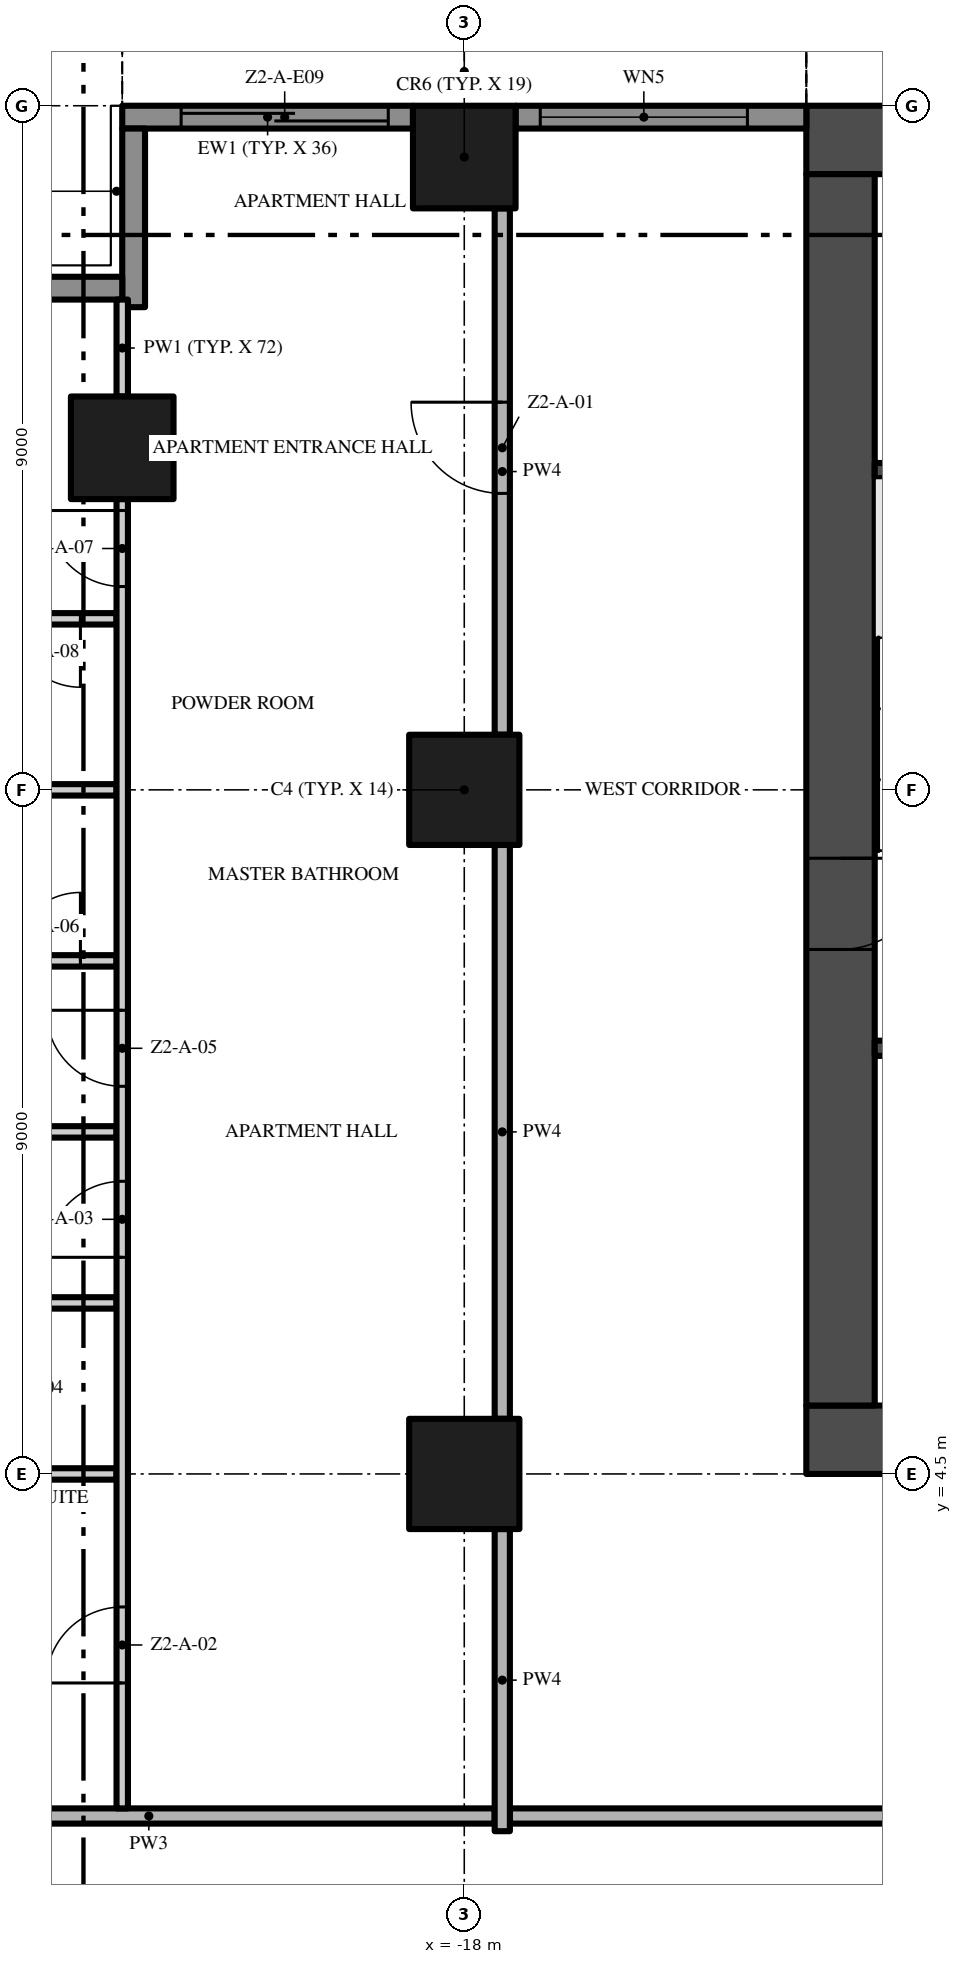
"""IFC4 building model, lengths in metres.
Left out: names, types, materials, properties, quantities, classifications, styles, units other than length and angle.
Written with IfcOpenShell. Run it as: python <this file> out.ifc"""

import sys

from ifc_helpers import new_model, si_unit, direction, frame, frame_2d, origin, origin_2d, place, context, subcontext, project, spatial, rectangle, extrude, element, fill, save


model = new_model("IFC4")
c1 = context("Model", 3, precision=1e-05, world=origin(), true_north=direction((0.0, 1.0)))
c2 = subcontext(c1, "Body", "Model", "MODEL_VIEW")
j1 = project(units=[si_unit("LENGTHUNIT", "METRE"), si_unit("PLANEANGLEUNIT", "RADIAN")], contexts=[c1])
p1 = place(None, origin())
s1 = spatial("IfcSite", under=j1, at=p1, CompositionType="ELEMENT")
p2 = place(p1, origin())
s2 = spatial("IfcBuilding", under=s1, at=p2, CompositionType="ELEMENT")
p3 = place(p2, frame((0.0, 0.0, 73.2)))
s3 = spatial("IfcBuildingStorey", under=s2, at=p3, CompositionType="ELEMENT", Elevation=73.2)
p4 = place(p3, frame((-13.5, 4.95, -0.3), z_axis=(0.0, 0.0, 1.0), x_axis=(1.0, 0.0, 0.0)))
e1 = element("IfcWall", 1, at=p4, inside=s3, PredefinedType="SHEAR", context=c2, shape_type="SweptSolid", body=[
    extrude(rectangle(XDim=27.0, YDim=0.9, at=frame_2d((13.5, 0.0))), origin(), (0.0, 0.0, 1.0), 3.8),
])
p5 = place(p4, frame((12.0, 0.0, 0.3)))
e2 = element("IfcOpeningElement", 2, at=p5, cuts=e1, PredefinedType="OPENING", context=c2, shape_type="SweptSolid", body=[
    extrude(rectangle(XDim=3.0, YDim=2.4, at=frame_2d((1.5, 1.2))), frame((0.0, 0.46, 0.0), z_axis=(0.0, -1.0, 0.0), x_axis=(1.0, 0.0, 0.0)), (0.0, 0.0, 1.0), 0.92),
])
p6 = place(p4, frame((4.9, 0.0, 0.3)))
e3 = element("IfcOpeningElement", 3, at=p6, cuts=e1, PredefinedType="OPENING", context=c2, shape_type="SweptSolid", body=[
    extrude(rectangle(XDim=1.2, YDim=2.2, at=frame_2d((0.6, 1.1))), frame((0.0, 0.46, 0.0), z_axis=(0.0, -1.0, 0.0), x_axis=(1.0, 0.0, 0.0)), (0.0, 0.0, 1.0), 0.92),
])
p7 = place(p4, frame((20.75, 0.0, 0.3)))
e4 = element("IfcOpeningElement", 4, at=p7, cuts=e1, PredefinedType="OPENING", context=c2, shape_type="SweptSolid", body=[
    extrude(rectangle(XDim=1.5, YDim=2.2, at=frame_2d((0.75, 1.1))), frame((0.0, 0.46, 0.0), z_axis=(0.0, -1.0, 0.0), x_axis=(1.0, 0.0, 0.0)), (0.0, 0.0, 1.0), 0.92),
])
p8 = place(p4, frame((17.4, 0.0, 0.3)))
e5 = element("IfcOpeningElement", 5, at=p8, cuts=e1, PredefinedType="OPENING", context=c2, shape_type="SweptSolid", body=[
    extrude(rectangle(XDim=1.2, YDim=2.2, at=frame_2d((0.6, 1.1))), frame((0.0, 0.46, 0.0), z_axis=(0.0, -1.0, 0.0), x_axis=(1.0, 0.0, 0.0)), (0.0, 0.0, 1.0), 0.92),
])
p9 = place(p3, frame((13.5, 22.05, -0.3), z_axis=(0.0, 0.0, 1.0), x_axis=(-1.0, 0.0, 0.0)))
e6 = element("IfcWall", 6, at=p9, inside=s3, PredefinedType="SHEAR", context=c2, shape_type="SweptSolid", body=[
    extrude(rectangle(XDim=27.0, YDim=0.9, at=frame_2d((13.5, 0.0))), origin(), (0.0, 0.0, 1.0), 3.8),
])
p10 = place(p3, frame((-13.05, 21.6, -0.3), z_axis=(0.0, 0.0, 1.0), x_axis=(0.0, -1.0, 0.0)))
e7 = element("IfcWall", 7, at=p10, inside=s3, PredefinedType="SHEAR", context=c2, shape_type="SweptSolid", body=[
    extrude(rectangle(XDim=16.2, YDim=0.9, at=frame_2d((8.1, 0.0))), origin(), (0.0, 0.0, 1.0), 3.8),
])
p11 = place(p10, frame((9.0, 0.0, 0.3)))
e8 = element("IfcOpeningElement", 8, at=p11, cuts=e7, PredefinedType="OPENING", context=c2, shape_type="SweptSolid", body=[
    extrude(rectangle(XDim=1.2, YDim=2.2, at=frame_2d((0.6, 1.1))), frame((0.0, 0.46, 0.0), z_axis=(0.0, -1.0, 0.0), x_axis=(1.0, 0.0, 0.0)), (0.0, 0.0, 1.0), 0.92),
])
p12 = place(p3, frame((-18.0, 13.5, 0.0), z_axis=(0.0, 0.0, 1.0), x_axis=(1.0, 0.0, 0.0)))
e9 = element("IfcColumn", 9, at=p12, inside=s3, PredefinedType="COLUMN", context=c2, shape_type="SweptSolid", body=[
    extrude(rectangle(XDim=1.45, YDim=1.45, at=origin_2d()), origin(), (0.0, 0.0, 1.0), 3.5),
])
p13 = place(p3, frame((-18.0, 21.825, 0.0), z_axis=(0.0, 0.0, 1.0), x_axis=(1.0, 0.0, 0.0)))
e10 = element("IfcColumn", 10, at=p13, inside=s3, PredefinedType="COLUMN", context=c2, shape_type="SweptSolid", body=[
    extrude(rectangle(XDim=1.35, YDim=1.35, at=origin_2d()), origin(), (0.0, 0.0, 1.0), 3.5),
])
p14 = place(p3, frame((-18.0, 4.5, 0.0), z_axis=(0.0, 0.0, 1.0), x_axis=(1.0, 0.0, 0.0)))
e11 = element("IfcColumn", 11, at=p14, inside=s3, PredefinedType="COLUMN", context=c2, shape_type="SweptSolid", body=[
    extrude(rectangle(XDim=1.45, YDim=1.45, at=origin_2d()), origin(), (0.0, 0.0, 1.0), 3.5),
])
p15 = place(p3, frame((-22.5, 18.0, 0.0), z_axis=(0.0, 0.0, 1.0), x_axis=(1.0, 0.0, 0.0)))
e12 = element("IfcColumn", 12, at=p15, inside=s3, PredefinedType="COLUMN", context=c2, shape_type="SweptSolid", body=[
    extrude(rectangle(XDim=1.35, YDim=1.35, at=origin_2d()), origin(), (0.0, 0.0, 1.0), 3.5),
])
p16 = place(p3, frame((-17.325, 22.35, 0.0), z_axis=(0.0, 0.0, 1.0), x_axis=(1.0, 0.0, 0.0)))
e13 = element("IfcWall", 13, at=p16, inside=s3, PredefinedType="SOLIDWALL", context=c2, shape_type="SweptSolid", body=[
    extrude(rectangle(XDim=3.825, YDim=0.3, at=frame_2d((1.913, 0.0))), origin(), (0.0, 0.0, 1.0), 3.5),
])
p17 = place(p16, frame((0.325, 0.0, 0.45)))
e14 = element("IfcOpeningElement", 14, at=p17, cuts=e13, PredefinedType="OPENING", context=c2, shape_type="SweptSolid", body=[
    extrude(rectangle(XDim=2.725, YDim=2.65, at=frame_2d((1.363, 1.325))), frame((0.0, 0.16, 0.0), z_axis=(0.0, -1.0, 0.0), x_axis=(1.0, 0.0, 0.0)), (0.0, 0.0, 1.0), 0.32),
])
p18 = place(p3, frame((-22.5, 22.35, 0.0), z_axis=(0.0, 0.0, 1.0), x_axis=(1.0, 0.0, 0.0)))
e15 = element("IfcWall", 15, at=p18, inside=s3, PredefinedType="SOLIDWALL", context=c2, shape_type="SweptSolid", body=[
    extrude(rectangle(XDim=3.825, YDim=0.3, at=frame_2d((1.913, 0.0))), origin(), (0.0, 0.0, 1.0), 3.5),
])
p19 = place(p18, frame((0.775, 0.0, 0.0)))
e16 = element("IfcOpeningElement", 16, at=p19, cuts=e15, PredefinedType="OPENING", context=c2, shape_type="SweptSolid", body=[
    extrude(rectangle(XDim=2.725, YDim=2.4, at=frame_2d((1.363, 1.2))), frame((0.0, 0.16, 0.0), z_axis=(0.0, -1.0, 0.0), x_axis=(1.0, 0.0, 0.0)), (0.0, 0.0, 1.0), 0.32),
])
p20 = place(p3, frame((-22.35, 19.85, 0.0), z_axis=(0.0, 0.0, 1.0), x_axis=(0.0, 1.0, 0.0)))
e17 = element("IfcWall", 17, at=p20, inside=s3, PredefinedType="SOLIDWALL", context=c2, shape_type="SweptSolid", body=[
    extrude(rectangle(XDim=2.35, YDim=0.3, at=frame_2d((1.175, 0.0))), origin(), (0.0, 0.0, 1.0), 3.5),
])
p21 = place(p3, frame((-24.75, 20.1, 0.0), z_axis=(0.0, 0.0, 1.0), x_axis=(1.0, 0.0, 0.0)))
e18 = element("IfcWall", 18, at=p21, inside=s3, PredefinedType="SOLIDWALL", context=c2, shape_type="SweptSolid", body=[
    extrude(rectangle(XDim=2.25, YDim=0.3, at=frame_2d((1.125, 0.0))), origin(), (0.0, 0.0, 1.0), 3.5),
])
for number, where, z_axis, x_axis in (
    (19, (-12.6, 10.1, 0.0), (0.0, 0.0, 1.0), (1.0, 0.0, 0.0)),
    (20, (-12.6, 17.7, 0.0), (0.0, 0.0, 1.0), (1.0, 0.0, 0.0)),
):
    element("IfcWall", number, at=place(p3, frame(where, z_axis=z_axis, x_axis=x_axis)), inside=s3, PredefinedType="SHEAR", context=c2, shape_type="SweptSolid", body=[
        extrude(rectangle(XDim=2.95, YDim=0.2, at=frame_2d((1.475, 0.0))), origin(), (0.0, 0.0, 1.0), 3.5),
    ])
p22 = place(p3, frame((-0.1, 0.0, 0.0), z_axis=(0.0, 0.0, 1.0), x_axis=(-1.0, 0.0, 0.0)))
e21 = element("IfcWall", 21, at=p22, inside=s3, PredefinedType="PARTITIONING", context=c2, shape_type="SweptSolid", body=[
    extrude(rectangle(XDim=17.3, YDim=0.2, at=frame_2d((8.65, 0.0))), origin(), (0.0, 0.0, 1.0), 3.5),
])
p23 = place(p22, frame((8.15, 0.0, 0.0)))
e22 = element("IfcOpeningElement", 22, at=p23, cuts=e21, PredefinedType="OPENING", context=c2, shape_type="SweptSolid", body=[
    extrude(rectangle(XDim=1.5, YDim=2.4, at=frame_2d((0.75, 1.2))), frame((0.0, 0.11, 0.0), z_axis=(0.0, -1.0, 0.0), x_axis=(1.0, 0.0, 0.0)), (0.0, 0.0, 1.0), 0.22),
])
p24 = place(p3, frame((-26.7, 0.0, 0.0), z_axis=(0.0, 0.0, 1.0), x_axis=(1.0, 0.0, 0.0)))
e23 = element("IfcWall", 23, at=p24, inside=s3, PredefinedType="PARTITIONING", context=c2, shape_type="SweptSolid", body=[
    extrude(rectangle(XDim=9.1, YDim=0.2, at=frame_2d((4.55, 0.0))), origin(), (0.0, 0.0, 1.0), 3.5),
])
p25 = place(p3, frame((-25.65, 4.5, 0.0), z_axis=(0.0, 0.0, 1.0), x_axis=(1.0, 0.0, 0.0)))
e24 = element("IfcWall", 24, at=p25, inside=s3, PredefinedType="PARTITIONING", context=c2, shape_type="SweptSolid", body=[
    extrude(rectangle(XDim=3.075, YDim=0.15, at=frame_2d((1.538, 0.0))), origin(), (0.0, 0.0, 1.0), 3.5),
])
p26 = place(p3, frame((-24.45, 6.75, 0.0), z_axis=(0.0, 0.0, 1.0), x_axis=(1.0, 0.0, 0.0)))
e25 = element("IfcWall", 25, at=p26, inside=s3, PredefinedType="PARTITIONING", context=c2, shape_type="SweptSolid", body=[
    extrude(rectangle(XDim=1.875, YDim=0.15, at=frame_2d((0.938, 0.0))), origin(), (0.0, 0.0, 1.0), 3.5),
])
p27 = place(p3, frame((-26.7, 9.0, 0.0), z_axis=(0.0, 0.0, 1.0), x_axis=(1.0, 0.0, 0.0)))
e26 = element("IfcWall", 26, at=p27, inside=s3, PredefinedType="PARTITIONING", context=c2, shape_type="SweptSolid", body=[
    extrude(rectangle(XDim=4.125, YDim=0.15, at=frame_2d((2.062, 0.0))), origin(), (0.0, 0.0, 1.0), 3.5),
])
p28 = place(p3, frame((-24.45, 11.25, 0.0), z_axis=(0.0, 0.0, 1.0), x_axis=(1.0, 0.0, 0.0)))
e27 = element("IfcWall", 27, at=p28, inside=s3, PredefinedType="PARTITIONING", context=c2, shape_type="SweptSolid", body=[
    extrude(rectangle(XDim=1.875, YDim=0.15, at=frame_2d((0.938, 0.0))), origin(), (0.0, 0.0, 1.0), 3.5),
])
p29 = place(p28, frame((0.5, 0.0, 0.0)))
e28 = element("IfcOpeningElement", 28, at=p29, cuts=e27, PredefinedType="OPENING", context=c2, shape_type="SweptSolid", body=[
    extrude(rectangle(XDim=0.9, YDim=2.1, at=frame_2d((0.45, 1.05))), frame((0.0, 0.085, 0.0), z_axis=(0.0, -1.0, 0.0), x_axis=(1.0, 0.0, 0.0)), (0.0, 0.0, 1.0), 0.17),
])
p30 = place(p3, frame((-24.45, 13.5, 0.0), z_axis=(0.0, 0.0, 1.0), x_axis=(1.0, 0.0, 0.0)))
e29 = element("IfcWall", 29, at=p30, inside=s3, PredefinedType="PARTITIONING", context=c2, shape_type="SweptSolid", body=[
    extrude(rectangle(XDim=1.875, YDim=0.15, at=frame_2d((0.938, 0.0))), origin(), (0.0, 0.0, 1.0), 3.5),
])
p31 = place(p3, frame((-22.575, 15.75, 0.0), z_axis=(0.0, 0.0, 1.0), x_axis=(-1.0, 0.0, 0.0)))
e30 = element("IfcWall", 30, at=p31, inside=s3, PredefinedType="PARTITIONING", context=c2, shape_type="SweptSolid", body=[
    extrude(rectangle(XDim=1.875, YDim=0.15, at=frame_2d((0.938, 0.0))), origin(), (0.0, 0.0, 1.0), 3.5),
])
p32 = place(p31, frame((0.475, 0.0, 0.0)))
e31 = element("IfcOpeningElement", 31, at=p32, cuts=e30, PredefinedType="OPENING", context=c2, shape_type="SweptSolid", body=[
    extrude(rectangle(XDim=0.9, YDim=2.1, at=frame_2d((0.45, 1.05))), frame((0.0, 0.085, 0.0), z_axis=(0.0, -1.0, 0.0), x_axis=(1.0, 0.0, 0.0)), (0.0, 0.0, 1.0), 0.17),
])
p33 = place(p3, frame((-22.5, 0.1, 0.0), z_axis=(0.0, 0.0, 1.0), x_axis=(0.0, 1.0, 0.0)))
e32 = element("IfcWall", 32, at=p33, inside=s3, PredefinedType="PARTITIONING", context=c2, shape_type="SweptSolid", body=[
    extrude(rectangle(XDim=17.225, YDim=0.15, at=frame_2d((8.613, 0.0))), origin(), (0.0, 0.0, 1.0), 3.5),
])
p34 = place(p33, frame((1.65, 0.0, 0.0)))
e33 = element("IfcOpeningElement", 33, at=p34, cuts=e32, PredefinedType="OPENING", context=c2, shape_type="SweptSolid", body=[
    extrude(rectangle(XDim=1.0, YDim=2.4, at=frame_2d((0.5, 1.2))), frame((0.0, 0.085, 0.0), z_axis=(0.0, -1.0, 0.0), x_axis=(1.0, 0.0, 0.0)), (0.0, 0.0, 1.0), 0.17),
])
p35 = place(p33, frame((7.25, 0.0, 0.0)))
e34 = element("IfcOpeningElement", 34, at=p35, cuts=e32, PredefinedType="OPENING", context=c2, shape_type="SweptSolid", body=[
    extrude(rectangle(XDim=1.0, YDim=2.4, at=frame_2d((0.5, 1.2))), frame((0.0, 0.085, 0.0), z_axis=(0.0, -1.0, 0.0), x_axis=(1.0, 0.0, 0.0)), (0.0, 0.0, 1.0), 0.17),
])
p36 = place(p33, frame((9.5, 0.0, 0.0)))
e35 = element("IfcOpeningElement", 35, at=p36, cuts=e32, PredefinedType="OPENING", context=c2, shape_type="SweptSolid", body=[
    extrude(rectangle(XDim=1.0, YDim=2.4, at=frame_2d((0.5, 1.2))), frame((0.0, 0.085, 0.0), z_axis=(0.0, -1.0, 0.0), x_axis=(1.0, 0.0, 0.0)), (0.0, 0.0, 1.0), 0.17),
])
p37 = place(p33, frame((16.075, 0.0, 0.0)))
e36 = element("IfcOpeningElement", 36, at=p37, cuts=e32, PredefinedType="OPENING", context=c2, shape_type="SweptSolid", body=[
    extrude(rectangle(XDim=1.0, YDim=2.4, at=frame_2d((0.5, 1.2))), frame((0.0, 0.085, 0.0), z_axis=(0.0, -1.0, 0.0), x_axis=(1.0, 0.0, 0.0)), (0.0, 0.0, 1.0), 0.17),
])
p38 = place(p3, frame((-22.5, 18.675, 0.0), z_axis=(0.0, 0.0, 1.0), x_axis=(0.0, 1.0, 0.0)))
e37 = element("IfcWall", 37, at=p38, inside=s3, PredefinedType="PARTITIONING", context=c2, shape_type="SweptSolid", body=[
    extrude(rectangle(XDim=1.275, YDim=0.15, at=frame_2d((0.637, 0.0))), origin(), (0.0, 0.0, 1.0), 3.5),
])
p39 = place(p3, frame((-17.5, -0.2, 0.0), z_axis=(0.0, 0.0, 1.0), x_axis=(0.0, 1.0, 0.0)))
e38 = element("IfcWall", 38, at=p39, inside=s3, PredefinedType="PARTITIONING", context=c2, shape_type="SweptSolid", body=[
    extrude(rectangle(XDim=3.975, YDim=0.2, at=frame_2d((1.988, 0.0))), origin(), (0.0, 0.0, 1.0), 3.5),
])
p40 = place(p3, frame((-17.5, 5.225, 0.0), z_axis=(0.0, 0.0, 1.0), x_axis=(0.0, 1.0, 0.0)))
e39 = element("IfcWall", 39, at=p40, inside=s3, PredefinedType="PARTITIONING", context=c2, shape_type="SweptSolid", body=[
    extrude(rectangle(XDim=7.55, YDim=0.2, at=frame_2d((3.775, 0.0))), origin(), (0.0, 0.0, 1.0), 3.5),
])
p41 = place(p3, frame((-17.5, 14.225, 0.0), z_axis=(0.0, 0.0, 1.0), x_axis=(0.0, 1.0, 0.0)))
e40 = element("IfcWall", 40, at=p41, inside=s3, PredefinedType="PARTITIONING", context=c2, shape_type="SweptSolid", body=[
    extrude(rectangle(XDim=6.925, YDim=0.2, at=frame_2d((3.462, 0.0))), origin(), (0.0, 0.0, 1.0), 3.5),
])
p42 = place(p41, frame((3.175, 0.0, 0.0)))
e41 = element("IfcOpeningElement", 41, at=p42, cuts=e40, PredefinedType="OPENING", context=c2, shape_type="SweptSolid", body=[
    extrude(rectangle(XDim=1.2, YDim=2.4, at=frame_2d((0.6, 1.2))), frame((0.0, 0.11, 0.0), z_axis=(0.0, -1.0, 0.0), x_axis=(1.0, 0.0, 0.0)), (0.0, 0.0, 1.0), 0.22),
])
p43 = place(p17, origin())
e42 = element("IfcWindow", 42, at=p43, inside=s3, PartitioningType="SINGLE_PANEL", PredefinedType="WINDOW", context=c2, shape_type="SweptSolid", body=[
    extrude(rectangle(XDim=2.725, YDim=2.65, at=frame_2d((1.363, 1.325))), frame((0.0, 0.03, 0.0), z_axis=(0.0, -1.0, 0.0), x_axis=(1.0, 0.0, 0.0)), (0.0, 0.0, 1.0), 0.06),
])
fill(e14, e42)
p44 = place(p19, origin())
e43 = element("IfcDoor", 43, at=p44, inside=s3, OperationType="SINGLE_SWING_LEFT", PredefinedType="DOOR", context=c2, shape_type="SweptSolid", body=[
    extrude(rectangle(XDim=2.725, YDim=2.4, at=frame_2d((1.363, 1.2))), frame((0.0, 0.025, 0.0), z_axis=(0.0, -1.0, 0.0), x_axis=(1.0, 0.0, 0.0)), (0.0, 0.0, 1.0), 0.05),
])
fill(e16, e43)
p45 = place(p11, frame((1.2, 0.0, 0.0), z_axis=(0.0, 0.0, 1.0), x_axis=(-1.0, 0.0, 0.0)))
e44 = element("IfcDoor", 44, at=p45, inside=s3, OperationType="SINGLE_SWING_RIGHT", PredefinedType="DOOR", context=c2, shape_type="SweptSolid", body=[
    extrude(rectangle(XDim=1.2, YDim=2.2, at=frame_2d((0.6, 1.1))), frame((0.0, 0.025, 0.0), z_axis=(0.0, -1.0, 0.0), x_axis=(1.0, 0.0, 0.0)), (0.0, 0.0, 1.0), 0.05),
])
fill(e8, e44)
p46 = place(p42, origin())
e45 = element("IfcDoor", 45, at=p46, inside=s3, OperationType="SINGLE_SWING_RIGHT", PredefinedType="DOOR", context=c2, shape_type="SweptSolid", body=[
    extrude(rectangle(XDim=1.2, YDim=2.4, at=frame_2d((0.6, 1.2))), frame((0.0, 0.025, 0.0), z_axis=(0.0, -1.0, 0.0), x_axis=(1.0, 0.0, 0.0)), (0.0, 0.0, 1.0), 0.05),
])
fill(e41, e45)
p47 = place(p34, origin())
e46 = element("IfcDoor", 46, at=p47, inside=s3, OperationType="SINGLE_SWING_LEFT", PredefinedType="DOOR", context=c2, shape_type="SweptSolid", body=[
    extrude(rectangle(XDim=1.0, YDim=2.4, at=frame_2d((0.5, 1.2))), frame((0.0, 0.025, 0.0), z_axis=(0.0, -1.0, 0.0), x_axis=(1.0, 0.0, 0.0)), (0.0, 0.0, 1.0), 0.05),
])
fill(e33, e46)
p48 = place(p35, origin())
e47 = element("IfcDoor", 47, at=p48, inside=s3, OperationType="SINGLE_SWING_LEFT", PredefinedType="DOOR", context=c2, shape_type="SweptSolid", body=[
    extrude(rectangle(XDim=1.0, YDim=2.4, at=frame_2d((0.5, 1.2))), frame((0.0, 0.025, 0.0), z_axis=(0.0, -1.0, 0.0), x_axis=(1.0, 0.0, 0.0)), (0.0, 0.0, 1.0), 0.05),
])
fill(e34, e47)
p49 = place(p36, origin())
e48 = element("IfcDoor", 48, at=p49, inside=s3, OperationType="SINGLE_SWING_RIGHT", PredefinedType="DOOR", context=c2, shape_type="SweptSolid", body=[
    extrude(rectangle(XDim=1.0, YDim=2.4, at=frame_2d((0.5, 1.2))), frame((0.0, 0.025, 0.0), z_axis=(0.0, -1.0, 0.0), x_axis=(1.0, 0.0, 0.0)), (0.0, 0.0, 1.0), 0.05),
])
fill(e35, e48)
p50 = place(p29, origin())
e49 = element("IfcDoor", 49, at=p50, inside=s3, OperationType="SINGLE_SWING_RIGHT", PredefinedType="DOOR", context=c2, shape_type="SweptSolid", body=[
    extrude(rectangle(XDim=0.9, YDim=2.1, at=frame_2d((0.45, 1.05))), frame((0.0, 0.025, 0.0), z_axis=(0.0, -1.0, 0.0), x_axis=(1.0, 0.0, 0.0)), (0.0, 0.0, 1.0), 0.05),
])
fill(e28, e49)
p51 = place(p37, origin())
e50 = element("IfcDoor", 50, at=p51, inside=s3, OperationType="SINGLE_SWING_RIGHT", PredefinedType="DOOR", context=c2, shape_type="SweptSolid", body=[
    extrude(rectangle(XDim=1.0, YDim=2.4, at=frame_2d((0.5, 1.2))), frame((0.0, 0.025, 0.0), z_axis=(0.0, -1.0, 0.0), x_axis=(1.0, 0.0, 0.0)), (0.0, 0.0, 1.0), 0.05),
])
fill(e36, e50)
p52 = place(p32, origin())
e51 = element("IfcDoor", 51, at=p52, inside=s3, OperationType="SINGLE_SWING_LEFT", PredefinedType="DOOR", context=c2, shape_type="SweptSolid", body=[
    extrude(rectangle(XDim=0.9, YDim=2.1, at=frame_2d((0.45, 1.05))), frame((0.0, 0.025, 0.0), z_axis=(0.0, -1.0, 0.0), x_axis=(1.0, 0.0, 0.0)), (0.0, 0.0, 1.0), 0.05),
])
fill(e31, e51)
save(model, sys.argv[1])
